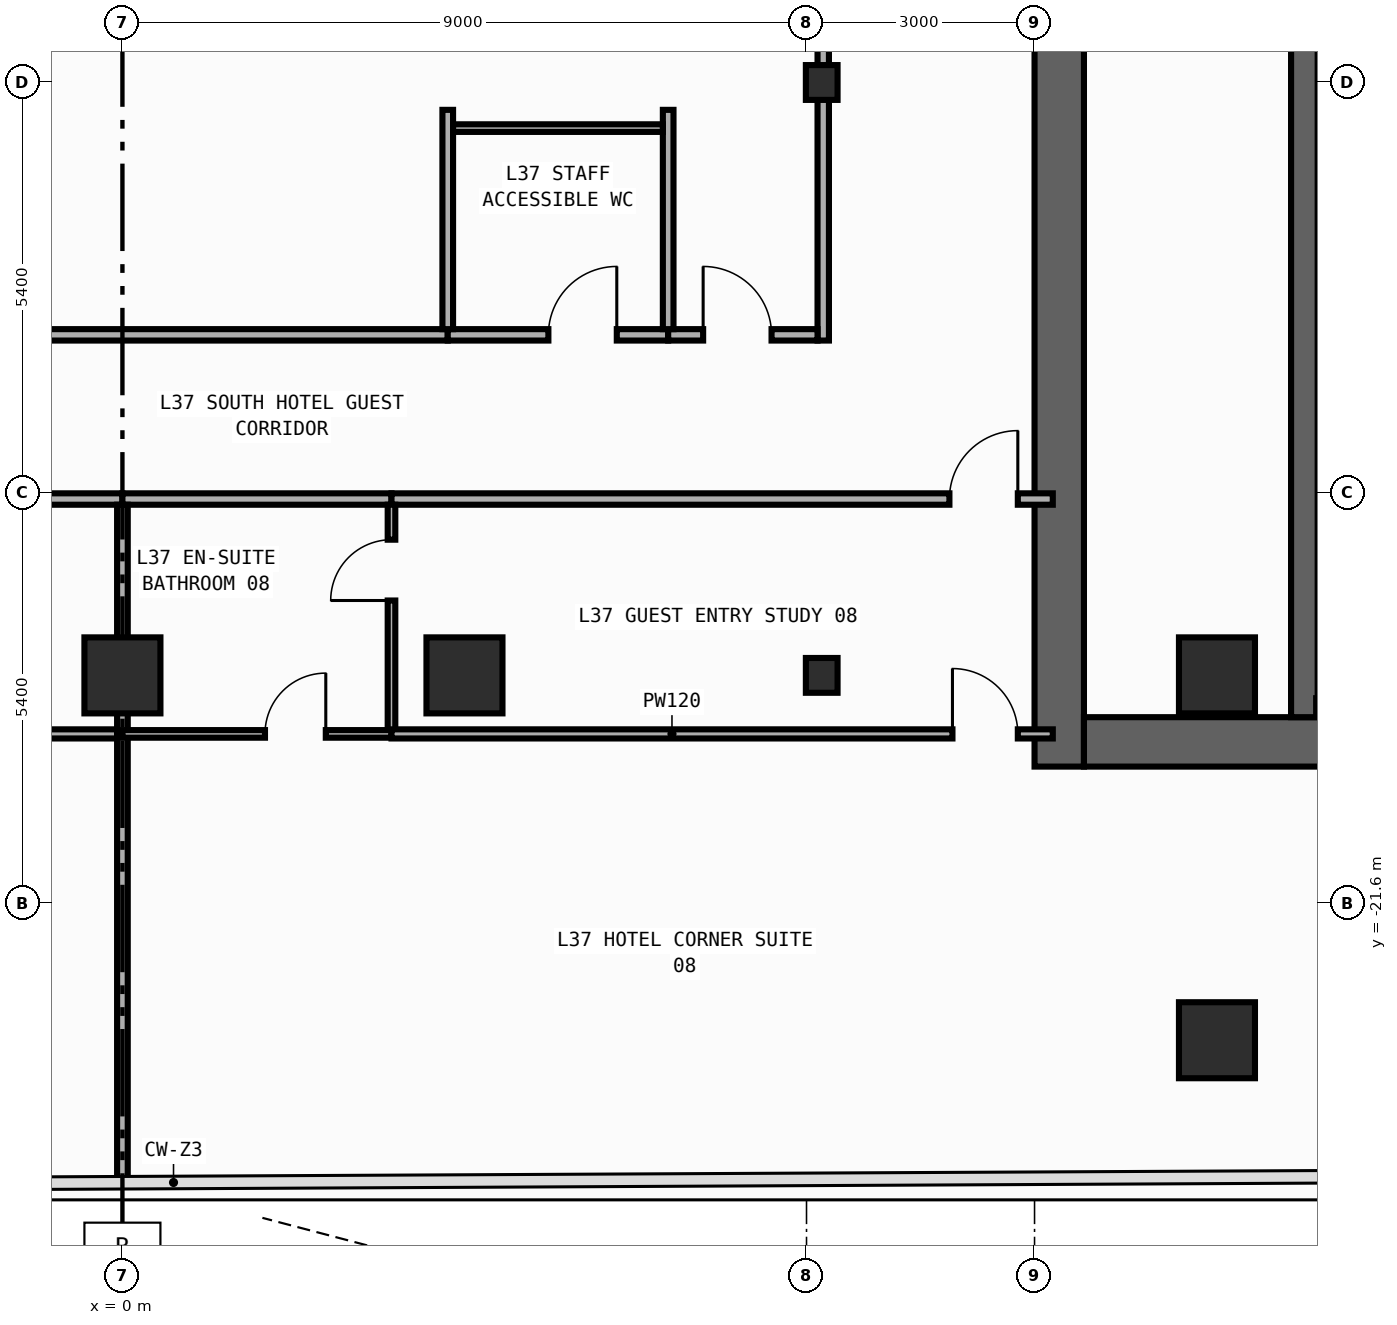
"""IFC4 building model, lengths in metres.
Left out: names, types, materials, properties, quantities, classifications, styles, units other than length and angle.
Written with IfcOpenShell. Run it as: python <this file> out.ifc"""

import sys

from ifc_helpers import new_model, si_unit, direction, frame, frame_2d, origin, origin_2d, place, context, subcontext, project, spatial, rectangle, i_section, extrude, element, fill, save


model = new_model("IFC4")
c1 = context("Model", 3, precision=1e-05, world=origin(), true_north=direction((0.0, 1.0)))
c2 = subcontext(c1, "Body", "Model", "MODEL_VIEW")
j1 = project(units=[si_unit("LENGTHUNIT", "METRE"), si_unit("PLANEANGLEUNIT", "RADIAN")], contexts=[c1])
p1 = place(None, origin())
s1 = spatial("IfcSite", under=j1, at=p1, CompositionType="ELEMENT")
p2 = place(p1, origin())
s2 = spatial("IfcBuilding", under=s1, at=p2, CompositionType="ELEMENT")
p3 = place(p2, frame((0.0, 0.0, 165.0)))
s3 = spatial("IfcBuildingStorey", under=s2, at=p3, CompositionType="ELEMENT", Elevation=165.0)
p4 = place(p3, frame((12.325, -19.8, 0.0), z_axis=(0.0, 0.0, 1.0), x_axis=(0.0, 1.0, 0.0)))
e1 = element("IfcWall", 1, at=p4, inside=s3, PredefinedType="SHEAR", context=c2, shape_type="SweptSolid", body=[
    extrude(rectangle(XDim=27.0, YDim=0.65, at=frame_2d((13.5, 0.0))), origin(), (0.0, 0.0, 1.0), 3.54),
])
p5 = place(p4, frame((23.05, 0.0, 0.0)))
e2 = element("IfcOpeningElement", 2, at=p5, cuts=e1, PredefinedType="OPENING", context=c2, shape_type="SweptSolid", body=[
    extrude(rectangle(XDim=1.1, YDim=2.2, at=frame_2d((0.55, 1.1))), frame((0.0, 0.335, 0.0), z_axis=(0.0, -1.0, 0.0), x_axis=(1.0, 0.0, 0.0)), (0.0, 0.0, 1.0), 0.67),
])
p6 = place(p4, frame((19.85, 0.0, 0.0)))
e3 = element("IfcOpeningElement", 3, at=p6, cuts=e1, PredefinedType="OPENING", context=c2, shape_type="SweptSolid", body=[
    extrude(rectangle(XDim=1.1, YDim=2.2, at=frame_2d((0.55, 1.1))), frame((0.0, 0.335, 0.0), z_axis=(0.0, -1.0, 0.0), x_axis=(1.0, 0.0, 0.0)), (0.0, 0.0, 1.0), 0.67),
])
p7 = place(p4, frame((16.65, 0.0, 0.0)))
e4 = element("IfcOpeningElement", 4, at=p7, cuts=e1, PredefinedType="OPENING", context=c2, shape_type="SweptSolid", body=[
    extrude(rectangle(XDim=1.1, YDim=2.2, at=frame_2d((0.55, 1.1))), frame((0.0, 0.335, 0.0), z_axis=(0.0, -1.0, 0.0), x_axis=(1.0, 0.0, 0.0)), (0.0, 0.0, 1.0), 0.67),
])
p8 = place(p4, frame((10.175, 0.0, 0.0)))
e5 = element("IfcOpeningElement", 5, at=p8, cuts=e1, PredefinedType="OPENING", context=c2, shape_type="SweptSolid", body=[
    extrude(rectangle(XDim=0.85, YDim=2.1, at=frame_2d((0.425, 1.05))), frame((0.0, 0.335, 0.0), z_axis=(0.0, -1.0, 0.0), x_axis=(1.0, 0.0, 0.0)), (0.0, 0.0, 1.0), 0.67),
])
p9 = place(p4, frame((12.725, 0.0, 0.0)))
e6 = element("IfcOpeningElement", 6, at=p9, cuts=e1, PredefinedType="OPENING", context=c2, shape_type="SweptSolid", body=[
    extrude(rectangle(XDim=1.15, YDim=2.2, at=frame_2d((0.575, 1.1))), frame((0.0, 0.335, 0.0), z_axis=(0.0, -1.0, 0.0), x_axis=(1.0, 0.0, 0.0)), (0.0, 0.0, 1.0), 0.67),
])
p10 = place(p4, frame((25.125, 0.0, 0.0)))
e7 = element("IfcOpeningElement", 7, at=p10, cuts=e1, PredefinedType="OPENING", context=c2, shape_type="SweptSolid", body=[
    extrude(rectangle(XDim=0.85, YDim=2.1, at=frame_2d((0.425, 1.05))), frame((0.0, 0.335, 0.0), z_axis=(0.0, -1.0, 0.0), x_axis=(1.0, 0.0, 0.0)), (0.0, 0.0, 1.0), 0.67),
])
p11 = place(p3, frame((12.65, -19.475, 0.0), z_axis=(0.0, 0.0, 1.0), x_axis=(1.0, 0.0, 0.0)))
e8 = element("IfcWall", 8, at=p11, inside=s3, PredefinedType="SHEAR", context=c2, shape_type="SweptSolid", body=[
    extrude(rectangle(XDim=7.1, YDim=0.65, at=frame_2d((3.55, 0.0))), origin(), (0.0, 0.0, 1.0), 3.54),
])
p12 = place(p3, frame((15.55, -19.15, 0.0), z_axis=(0.0, 0.0, 1.0), x_axis=(0.0, 1.0, 0.0)))
e9 = element("IfcWall", 9, at=p12, inside=s3, PredefinedType="SHEAR", context=c2, shape_type="SweptSolid", body=[
    extrude(rectangle(XDim=25.7, YDim=0.35, at=frame_2d((12.85, 0.0))), origin(), (0.0, 0.0, 1.0), 3.54),
])
p13 = place(p12, frame((12.075, 0.0, 0.0)))
e10 = element("IfcOpeningElement", 10, at=p13, cuts=e9, PredefinedType="OPENING", context=c2, shape_type="SweptSolid", body=[
    extrude(rectangle(XDim=1.15, YDim=2.2, at=frame_2d((0.575, 1.1))), frame((0.0, 0.185, 0.0), z_axis=(0.0, -1.0, 0.0), x_axis=(1.0, 0.0, 0.0)), (0.0, 0.0, 1.0), 0.37),
])
p14 = place(p12, frame((24.475, 0.0, 0.0)))
e11 = element("IfcOpeningElement", 11, at=p14, cuts=e9, PredefinedType="OPENING", context=c2, shape_type="SweptSolid", body=[
    extrude(rectangle(XDim=0.85, YDim=2.1, at=frame_2d((0.425, 1.05))), frame((0.0, 0.185, 0.0), z_axis=(0.0, -1.0, 0.0), x_axis=(1.0, 0.0, 0.0)), (0.0, 0.0, 1.0), 0.37),
])
p15 = place(p3, frame((15.705, -19.01, 0.0), z_axis=(0.0, 0.0, 1.0), x_axis=(1.0, 0.0, 0.0)))
e12 = element("IfcWall", 12, at=p15, inside=s3, PredefinedType="SHEAR", context=c2, shape_type="SweptSolid", body=[
    extrude(rectangle(XDim=4.065, YDim=0.22, at=frame_2d((2.032, 0.0))), origin(), (0.0, 0.0, 1.0), 3.54),
])
for number, where, z_axis, x_axis in (
    (13, (9.2, -18.6, 0.0), (0.0, 0.0, 1.0), (1.0, 0.0, 0.0)),
    (14, (9.2, -10.8, 0.0), (0.0, 0.0, 1.0), (1.0, 0.0, 0.0)),
):
    element("IfcColumn", number, at=place(p3, frame(where, z_axis=z_axis, x_axis=x_axis)), inside=s3, PredefinedType="COLUMN", context=c2, shape_type="SweptSolid", body=[
        extrude(i_section(OverallWidth=0.417, OverallDepth=0.458, WebThickness=0.03, FlangeThickness=0.05, FilletRadius=0.022, at=origin_2d()), origin(), (0.0, 0.0, 1.0), 3.8),
    ])
for number, where, z_axis, x_axis in (
    (15, (14.4, -18.6, 0.0), (0.0, 0.0, 1.0), (1.0, 0.0, 0.0)),
    (16, (0.0, -18.6, 0.0), (0.0, 0.0, 1.0), (1.0, 0.0, 0.0)),
    (17, (4.5, -18.6, 0.0), (0.0, 0.0, 1.0), (1.0, 0.0, 0.0)),
    (18, (14.4, -23.4, 0.0), (0.0, 0.0, 1.0), (1.0, 0.0, 0.0)),
):
    element("IfcColumn", number, at=place(p3, frame(where, z_axis=z_axis, x_axis=x_axis)), inside=s3, PredefinedType="COLUMN", context=c2, shape_type="SweptSolid", body=[
        extrude(rectangle(XDim=1.0, YDim=1.0, at=origin_2d()), origin(), (0.0, 0.0, 1.0), 3.8),
    ])
p16 = place(p3, frame((9.22, -14.195, 0.0), z_axis=(0.0, 0.0, 1.0), x_axis=(0.0, 1.0, 0.0)))
e19 = element("IfcWall", 19, at=p16, inside=s3, PredefinedType="PARTITIONING", context=c2, shape_type="SweptSolid", body=[
    extrude(rectangle(XDim=10.595, YDim=0.15, at=frame_2d((5.297, 0.0))), origin(), (0.0, 0.0, 1.0), 2.952),
])
p17 = place(p16, frame((8.419, 0.0, 0.0)))
e20 = element("IfcOpeningElement", 20, at=p17, cuts=e19, PredefinedType="OPENING", context=c2, shape_type="SweptSolid", body=[
    extrude(rectangle(XDim=0.9, YDim=2.15, at=frame_2d((0.45, 1.075))), frame((0.0, 0.085, 0.0), z_axis=(0.0, -1.0, 0.0), x_axis=(1.0, 0.0, 0.0)), (0.0, 0.0, 1.0), 0.17),
])
p18 = place(p3, frame((-3.32, -14.12, 0.0), z_axis=(0.0, 0.0, 1.0), x_axis=(1.0, 0.0, 0.0)))
e21 = element("IfcWall", 21, at=p18, inside=s3, PredefinedType="PARTITIONING", context=c2, shape_type="SweptSolid", body=[
    extrude(rectangle(XDim=7.6, YDim=0.15, at=frame_2d((3.8, 0.0))), origin(), (0.0, 0.0, 1.0), 3.54),
])
p19 = place(p18, frame((0.667, 0.0, 0.0)))
e22 = element("IfcOpeningElement", 22, at=p19, cuts=e21, PredefinedType="OPENING", context=c2, shape_type="SweptSolid", body=[
    extrude(rectangle(XDim=0.9, YDim=2.15, at=frame_2d((0.45, 1.075))), frame((0.0, 0.085, 0.0), z_axis=(0.0, -1.0, 0.0), x_axis=(1.0, 0.0, 0.0)), (0.0, 0.0, 1.0), 0.17),
])
p20 = place(p3, frame((4.28, -14.12, 0.0), z_axis=(0.0, 0.0, 1.0), x_axis=(1.0, 0.0, 0.0)))
e23 = element("IfcWall", 23, at=p20, inside=s3, PredefinedType="PARTITIONING", context=c2, shape_type="SweptSolid", body=[
    extrude(rectangle(XDim=2.9, YDim=0.15, at=frame_2d((1.45, 0.0))), origin(), (0.0, 0.0, 1.0), 3.54),
])
p21 = place(p20, frame((1.324, 0.0, 0.0)))
e24 = element("IfcOpeningElement", 24, at=p21, cuts=e23, PredefinedType="OPENING", context=c2, shape_type="SweptSolid", body=[
    extrude(rectangle(XDim=0.9, YDim=2.15, at=frame_2d((0.45, 1.075))), frame((0.0, 0.085, 0.0), z_axis=(0.0, -1.0, 0.0), x_axis=(1.0, 0.0, 0.0)), (0.0, 0.0, 1.0), 0.17),
])
p22 = place(p3, frame((7.18, -14.12, 0.0), z_axis=(0.0, 0.0, 1.0), x_axis=(1.0, 0.0, 0.0)))
e25 = element("IfcWall", 25, at=p22, inside=s3, PredefinedType="PARTITIONING", context=c2, shape_type="SweptSolid", body=[
    extrude(rectangle(XDim=1.965, YDim=0.15, at=frame_2d((0.982, 0.0))), origin(), (0.0, 0.0, 1.0), 3.54),
])
p23 = place(p22, frame((0.46, 0.0, 0.0)))
e26 = element("IfcOpeningElement", 26, at=p23, cuts=e25, PredefinedType="OPENING", context=c2, shape_type="SweptSolid", body=[
    extrude(rectangle(XDim=0.9, YDim=2.15, at=frame_2d((0.45, 1.075))), frame((0.0, 0.085, 0.0), z_axis=(0.0, -1.0, 0.0), x_axis=(1.0, 0.0, 0.0)), (0.0, 0.0, 1.0), 0.17),
])
p24 = place(p3, frame((-10.86, -16.28, 0.0), z_axis=(0.0, 0.0, 1.0), x_axis=(1.0, 0.0, 0.0)))
e27 = element("IfcWall", 27, at=p24, inside=s3, PredefinedType="PARTITIONING", context=c2, shape_type="SweptSolid", body=[
    extrude(rectangle(XDim=10.86, YDim=0.15, at=frame_2d((5.43, 0.0))), origin(), (0.0, 0.0, 1.0), 3.54),
])
p25 = place(p24, frame((3.272, 0.0, 0.0)))
e28 = element("IfcOpeningElement", 28, at=p25, cuts=e27, PredefinedType="OPENING", context=c2, shape_type="SweptSolid", body=[
    extrude(rectangle(XDim=0.9, YDim=2.15, at=frame_2d((0.45, 1.075))), frame((0.0, 0.085, 0.0), z_axis=(0.0, -1.0, 0.0), x_axis=(1.0, 0.0, 0.0)), (0.0, 0.0, 1.0), 0.17),
])
p26 = place(p3, frame((0.0, -16.28, 0.0), z_axis=(0.0, 0.0, 1.0), x_axis=(1.0, 0.0, 0.0)))
e29 = element("IfcWall", 29, at=p26, inside=s3, PredefinedType="PARTITIONING", context=c2, shape_type="SweptSolid", body=[
    extrude(rectangle(XDim=3.54, YDim=0.15, at=frame_2d((1.77, 0.0))), origin(), (0.0, 0.0, 1.0), 3.54),
])
p27 = place(p3, frame((3.54, -16.28, 0.0), z_axis=(0.0, 0.0, 1.0), x_axis=(1.0, 0.0, 0.0)))
e30 = element("IfcWall", 30, at=p27, inside=s3, PredefinedType="PARTITIONING", context=c2, shape_type="SweptSolid", body=[
    extrude(rectangle(XDim=8.7, YDim=0.15, at=frame_2d((4.35, 0.0))), origin(), (0.0, 0.0, 1.0), 3.54),
])
p28 = place(p27, frame((7.34, 0.0, 0.0)))
e31 = element("IfcOpeningElement", 31, at=p28, cuts=e30, PredefinedType="OPENING", context=c2, shape_type="SweptSolid", body=[
    extrude(rectangle(XDim=0.9, YDim=2.15, at=frame_2d((0.45, 1.075))), frame((0.0, 0.085, 0.0), z_axis=(0.0, -1.0, 0.0), x_axis=(1.0, 0.0, 0.0)), (0.0, 0.0, 1.0), 0.17),
])
for number, where, z_axis, x_axis in (
    (32, (4.28, -14.045, 0.0), (0.0, 0.0, 1.0), (0.0, 1.0, 0.0)),
    (33, (7.18, -14.045, 0.0), (0.0, 0.0, 1.0), (0.0, 1.0, 0.0)),
):
    element("IfcWall", number, at=place(p3, frame(where, z_axis=z_axis, x_axis=x_axis)), inside=s3, PredefinedType="PARTITIONING", context=c2, shape_type="SweptSolid", body=[
        extrude(rectangle(XDim=2.885, YDim=0.14, at=frame_2d((1.442, 0.0))), origin(), (0.0, 0.0, 1.0), 3.54),
    ])
p29 = place(p3, frame((-10.86, -19.37, 0.0), z_axis=(0.0, 0.0, 1.0), x_axis=(1.0, 0.0, 0.0)))
e34 = element("IfcWall", 34, at=p29, inside=s3, PredefinedType="PARTITIONING", context=c2, shape_type="SweptSolid", body=[
    extrude(rectangle(XDim=10.86, YDim=0.12, at=frame_2d((5.43, 0.0))), origin(), (0.0, 0.0, 1.0), 3.54),
])
p30 = place(p29, frame((3.487, 0.0, 0.0)))
e35 = element("IfcOpeningElement", 35, at=p30, cuts=e34, PredefinedType="OPENING", context=c2, shape_type="SweptSolid", body=[
    extrude(rectangle(XDim=0.86, YDim=2.15, at=frame_2d((0.43, 1.075))), frame((0.0, 0.07, 0.0), z_axis=(0.0, -1.0, 0.0), x_axis=(1.0, 0.0, 0.0)), (0.0, 0.0, 1.0), 0.14),
])
p31 = place(p3, frame((0.0, -19.37, 0.0), z_axis=(0.0, 0.0, 1.0), x_axis=(0.0, 1.0, 0.0)))
e36 = element("IfcWall", 36, at=p31, inside=s3, PredefinedType="PARTITIONING", context=c2, shape_type="SweptSolid", body=[
    extrude(rectangle(XDim=3.015, YDim=0.14, at=frame_2d((1.508, 0.0))), origin(), (0.0, 0.0, 1.0), 3.54),
])
p32 = place(p3, frame((0.0, -25.27, 0.0), z_axis=(0.0, 0.0, 1.0), x_axis=(0.0, 1.0, 0.0)))
e37 = element("IfcWall", 37, at=p32, inside=s3, PredefinedType="PARTITIONING", context=c2, shape_type="SweptSolid", body=[
    extrude(rectangle(XDim=5.9, YDim=0.14, at=frame_2d((2.95, 0.0))), origin(), (0.0, 0.0, 1.0), 3.54),
])
p33 = place(p3, frame((3.54, -19.32, 0.0), z_axis=(0.0, 0.0, 1.0), x_axis=(0.0, 1.0, 0.0)))
e38 = element("IfcWall", 38, at=p33, inside=s3, PredefinedType="PARTITIONING", context=c2, shape_type="SweptSolid", body=[
    extrude(rectangle(XDim=2.965, YDim=0.1, at=frame_2d((1.482, 0.0))), origin(), (0.0, 0.0, 1.0), 3.54),
])
p34 = place(p33, frame((1.705, 0.0, 0.0)))
e39 = element("IfcOpeningElement", 39, at=p34, cuts=e38, PredefinedType="OPENING", context=c2, shape_type="SweptSolid", body=[
    extrude(rectangle(XDim=0.8, YDim=2.1, at=frame_2d((0.4, 1.05))), frame((0.0, 0.06, 0.0), z_axis=(0.0, -1.0, 0.0), x_axis=(1.0, 0.0, 0.0)), (0.0, 0.0, 1.0), 0.12),
])
p35 = place(p3, frame((0.0, -19.37, 0.0), z_axis=(0.0, 0.0, 1.0), x_axis=(1.0, 0.0, 0.0)))
e40 = element("IfcWall", 40, at=p35, inside=s3, PredefinedType="PARTITIONING", context=c2, shape_type="SweptSolid", body=[
    extrude(rectangle(XDim=3.54, YDim=0.1, at=frame_2d((1.77, 0.0))), origin(), (0.0, 0.0, 1.0), 3.54),
])
p36 = place(p35, frame((1.875, 0.0, 0.0)))
e41 = element("IfcOpeningElement", 41, at=p36, cuts=e40, PredefinedType="OPENING", context=c2, shape_type="SweptSolid", body=[
    extrude(rectangle(XDim=0.8, YDim=2.1, at=frame_2d((0.4, 1.05))), frame((0.0, 0.06, 0.0), z_axis=(0.0, -1.0, 0.0), x_axis=(1.0, 0.0, 0.0)), (0.0, 0.0, 1.0), 0.12),
])
p37 = place(p3, frame((3.54, -19.37, 0.0), z_axis=(0.0, 0.0, 1.0), x_axis=(1.0, 0.0, 0.0)))
e42 = element("IfcWall", 42, at=p37, inside=s3, PredefinedType="PARTITIONING", context=c2, shape_type="SweptSolid", body=[
    extrude(rectangle(XDim=8.7, YDim=0.12, at=frame_2d((4.35, 0.0))), origin(), (0.0, 0.0, 1.0), 3.54),
])
p38 = place(p37, frame((7.38, 0.0, 0.0)))
e43 = element("IfcOpeningElement", 43, at=p38, cuts=e42, PredefinedType="OPENING", context=c2, shape_type="SweptSolid", body=[
    extrude(rectangle(XDim=0.86, YDim=2.15, at=frame_2d((0.43, 1.075))), frame((0.0, 0.07, 0.0), z_axis=(0.0, -1.0, 0.0), x_axis=(1.0, 0.0, 0.0)), (0.0, 0.0, 1.0), 0.14),
])
p39 = place(p3, frame((4.35, -11.4, 0.0), z_axis=(0.0, 0.0, 1.0), x_axis=(1.0, 0.0, 0.0)))
e44 = element("IfcWall", 44, at=p39, inside=s3, PredefinedType="PARTITIONING", context=c2, shape_type="SweptSolid", body=[
    extrude(rectangle(XDim=2.76, YDim=0.1, at=frame_2d((1.38, 0.0))), origin(), (0.0, 0.0, 1.0), 3.54),
])
p40 = place(p21, origin())
e45 = element("IfcDoor", 45, at=p40, inside=s3, OperationType="SINGLE_SWING_RIGHT", PredefinedType="DOOR", context=c2, shape_type="SweptSolid", body=[
    extrude(rectangle(XDim=0.9, YDim=2.15, at=frame_2d((0.45, 1.075))), frame((0.0, 0.025, 0.0), z_axis=(0.0, -1.0, 0.0), x_axis=(1.0, 0.0, 0.0)), (0.0, 0.0, 1.0), 0.05),
])
fill(e24, e45)
p41 = place(p23, origin())
e46 = element("IfcDoor", 46, at=p41, inside=s3, OperationType="SINGLE_SWING_LEFT", PredefinedType="DOOR", context=c2, shape_type="SweptSolid", body=[
    extrude(rectangle(XDim=0.9, YDim=2.15, at=frame_2d((0.45, 1.075))), frame((0.0, 0.025, 0.0), z_axis=(0.0, -1.0, 0.0), x_axis=(1.0, 0.0, 0.0)), (0.0, 0.0, 1.0), 0.05),
])
fill(e26, e46)
p42 = place(p28, origin())
e47 = element("IfcDoor", 47, at=p42, inside=s3, OperationType="SINGLE_SWING_RIGHT", PredefinedType="DOOR", context=c2, shape_type="SweptSolid", body=[
    extrude(rectangle(XDim=0.9, YDim=2.15, at=frame_2d((0.45, 1.075))), frame((0.0, 0.025, 0.0), z_axis=(0.0, -1.0, 0.0), x_axis=(1.0, 0.0, 0.0)), (0.0, 0.0, 1.0), 0.05),
])
fill(e31, e47)
p43 = place(p34, origin())
e48 = element("IfcDoor", 48, at=p43, inside=s3, OperationType="SINGLE_SWING_LEFT", PredefinedType="DOOR", context=c2, shape_type="SweptSolid", body=[
    extrude(rectangle(XDim=0.8, YDim=2.1, at=frame_2d((0.4, 1.05))), frame((0.0, 0.025, 0.0), z_axis=(0.0, -1.0, 0.0), x_axis=(1.0, 0.0, 0.0)), (0.0, 0.0, 1.0), 0.05),
])
fill(e39, e48)
p44 = place(p36, origin())
e49 = element("IfcDoor", 49, at=p44, inside=s3, OperationType="SINGLE_SWING_RIGHT", PredefinedType="DOOR", context=c2, shape_type="SweptSolid", body=[
    extrude(rectangle(XDim=0.8, YDim=2.1, at=frame_2d((0.4, 1.05))), frame((0.0, 0.025, 0.0), z_axis=(0.0, -1.0, 0.0), x_axis=(1.0, 0.0, 0.0)), (0.0, 0.0, 1.0), 0.05),
])
fill(e41, e49)
p45 = place(p38, origin())
e50 = element("IfcDoor", 50, at=p45, inside=s3, OperationType="SINGLE_SWING_LEFT", PredefinedType="DOOR", context=c2, shape_type="SweptSolid", body=[
    extrude(rectangle(XDim=0.86, YDim=2.15, at=frame_2d((0.43, 1.075))), frame((0.0, 0.025, 0.0), z_axis=(0.0, -1.0, 0.0), x_axis=(1.0, 0.0, 0.0)), (0.0, 0.0, 1.0), 0.05),
])
fill(e43, e50)
save(model, sys.argv[1])
